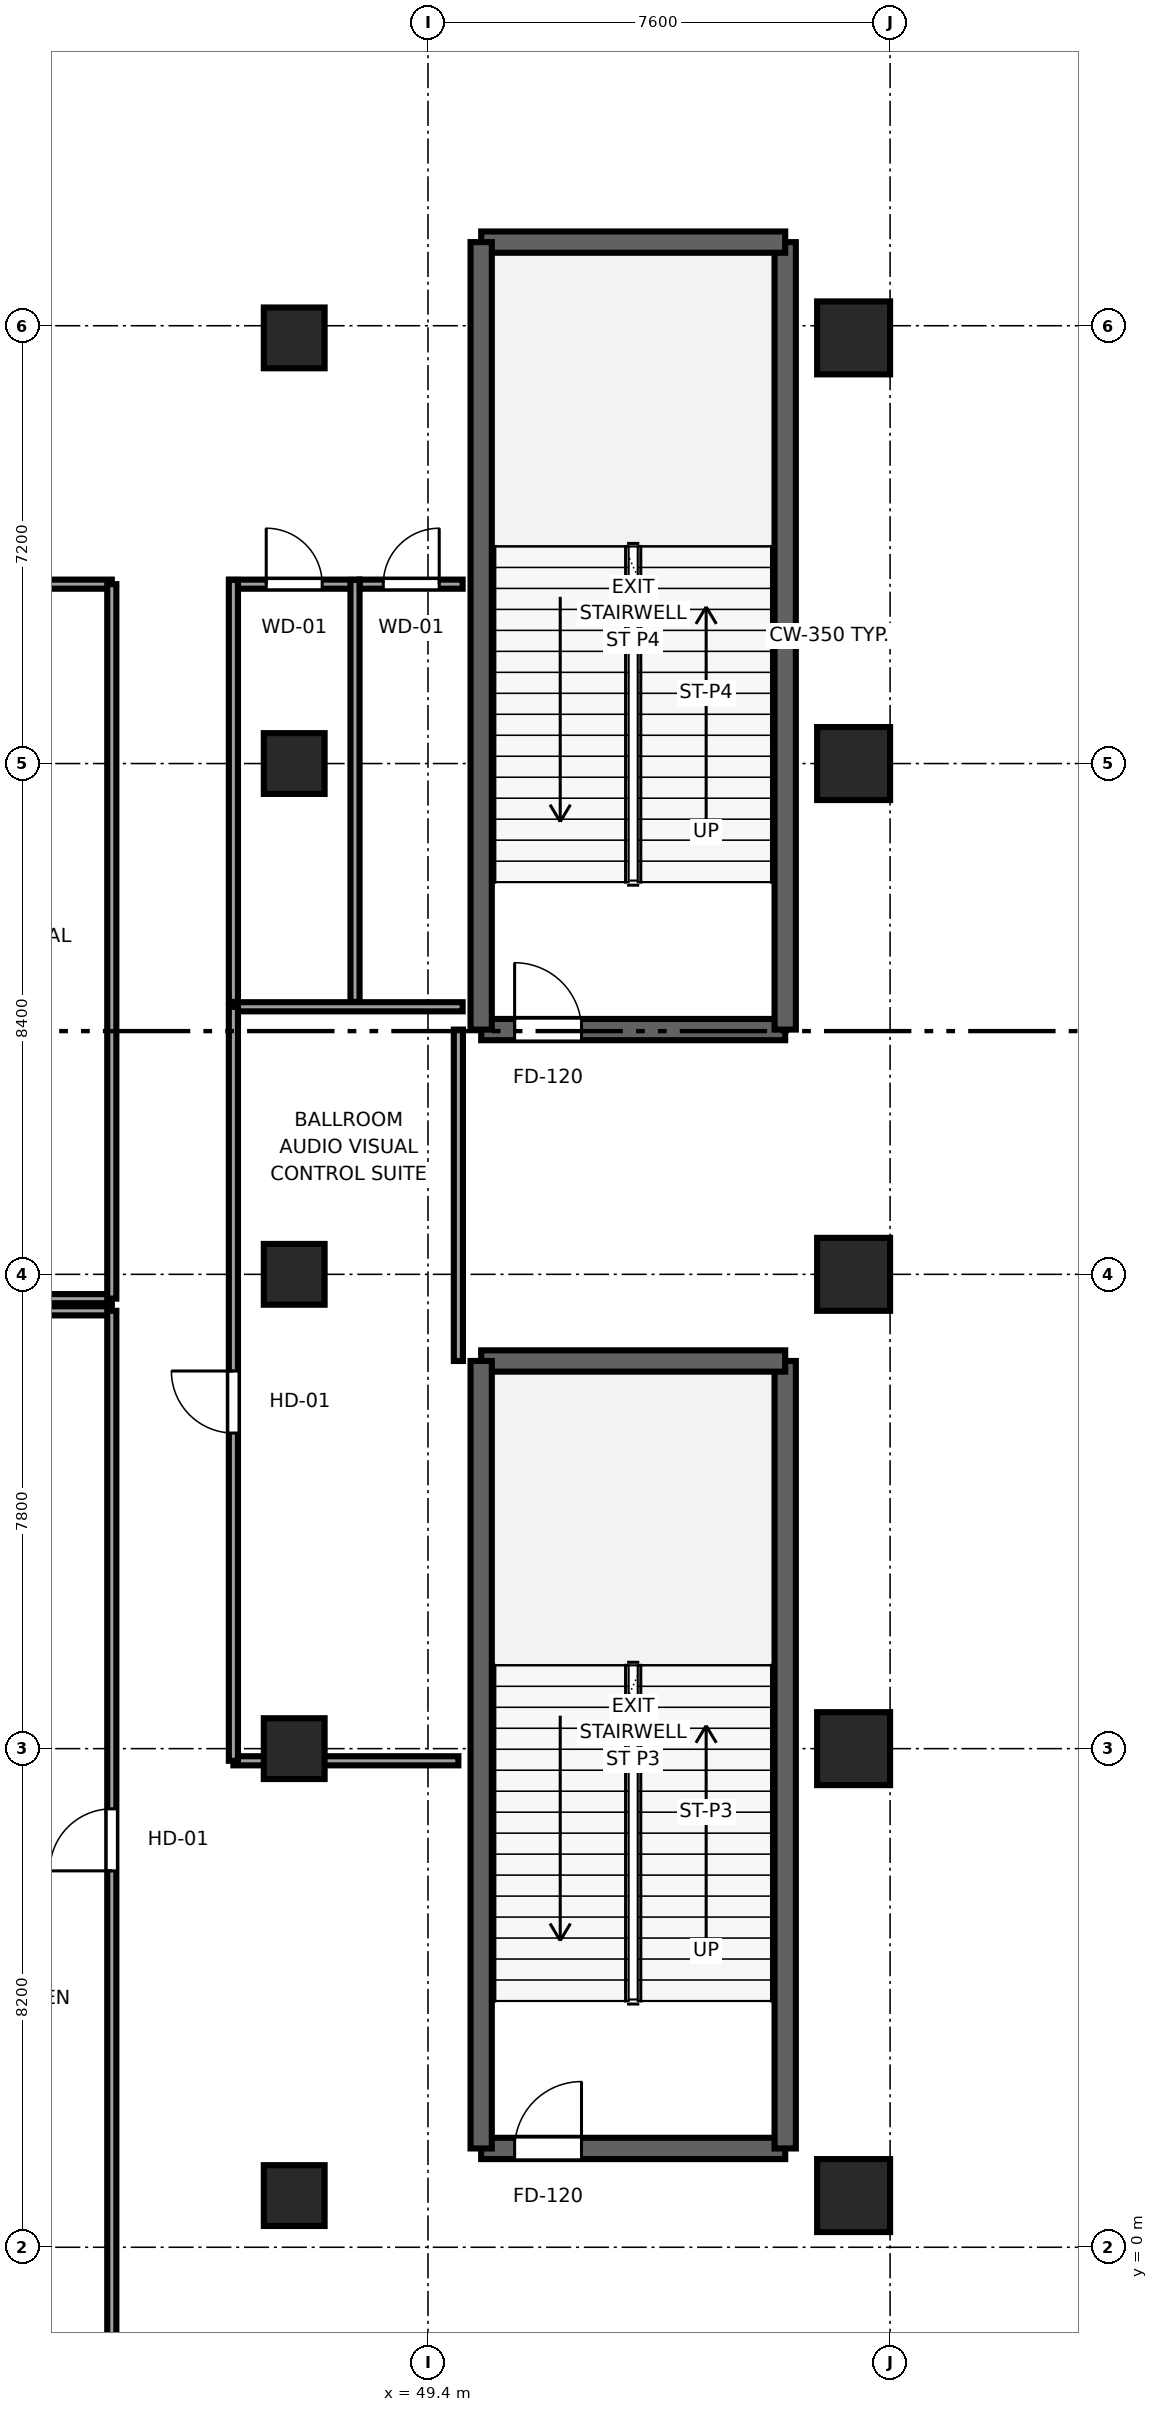
"""IFC4 building model, lengths in metres.
Left out: names, types, materials, properties, quantities, classifications, styles, units other than length and angle.
Written with IfcOpenShell. Run it as: python <this file> out.ifc"""

import sys

from ifc_helpers import new_model, si_unit, direction, frame, frame_2d, origin, origin_2d, place, context, subcontext, project, spatial, rectangle, extrude, source, transform, mapped, element, fill, save


model = new_model("IFC4")
c1 = context("Model", 3, precision=1e-05, world=origin(), true_north=direction((0.0, 1.0)))
c2 = subcontext(c1, "Body", "Model", "MODEL_VIEW")
j1 = project(units=[si_unit("LENGTHUNIT", "METRE"), si_unit("PLANEANGLEUNIT", "RADIAN")], contexts=[c1])
p1 = place(None, origin())
s1 = spatial("IfcSite", under=j1, at=p1, CompositionType="ELEMENT")
p2 = place(p1, origin())
s2 = spatial("IfcBuilding", under=s1, at=p2, CompositionType="ELEMENT")
p3 = place(p2, frame((0.0, 0.0, 16.0)))
s3 = spatial("IfcBuildingStorey", under=s2, at=p3, CompositionType="ELEMENT", Elevation=16.0)
p4 = place(p3, frame((50.275, 1.625, 0.0), z_axis=(0.0, 0.0, 1.0), x_axis=(1.0, 0.0, 0.0)))
e1 = element("IfcWall", 1, at=p4, inside=s3, PredefinedType="SHEAR", context=c2, shape_type="SweptSolid", body=[
    extrude(rectangle(XDim=5.0, YDim=0.35, at=frame_2d((2.5, 0.0))), origin(), (0.0, 0.0, 1.0), 6.4),
])
p5 = place(p4, frame((0.55, 0.0, 0.0)))
e2 = element("IfcOpeningElement", 2, at=p5, cuts=e1, PredefinedType="OPENING", context=c2, shape_type="SweptSolid", body=[
    extrude(rectangle(XDim=1.1, YDim=2.12, at=frame_2d((0.55, 1.06))), frame((0.0, 0.185, 0.0), z_axis=(0.0, -1.0, 0.0), x_axis=(1.0, 0.0, 0.0)), (0.0, 0.0, 1.0), 0.37),
])
p6 = place(p3, frame((55.275, 1.625, 0.0), z_axis=(0.0, 0.0, 1.0), x_axis=(0.0, 1.0, 0.0)))
e3 = element("IfcWall", 3, at=p6, inside=s3, PredefinedType="SHEAR", context=c2, shape_type="SweptSolid", body=[
    extrude(rectangle(XDim=12.95, YDim=0.35, at=frame_2d((6.475, 0.0))), origin(), (0.0, 0.0, 1.0), 6.4),
])
p7 = place(p3, frame((55.275, 14.575, 0.0), z_axis=(0.0, 0.0, 1.0), x_axis=(-1.0, 0.0, 0.0)))
e4 = element("IfcWall", 4, at=p7, inside=s3, PredefinedType="SHEAR", context=c2, shape_type="SweptSolid", body=[
    extrude(rectangle(XDim=5.0, YDim=0.35, at=frame_2d((2.5, 0.0))), origin(), (0.0, 0.0, 1.0), 6.4),
])
p8 = place(p3, frame((50.275, 14.575, 0.0), z_axis=(0.0, 0.0, 1.0), x_axis=(0.0, -1.0, 0.0)))
e5 = element("IfcWall", 5, at=p8, inside=s3, PredefinedType="SHEAR", context=c2, shape_type="SweptSolid", body=[
    extrude(rectangle(XDim=12.95, YDim=0.35, at=frame_2d((6.475, 0.0))), origin(), (0.0, 0.0, 1.0), 6.4),
])
p9 = place(p3, frame((50.275, 20.025, 0.0), z_axis=(0.0, 0.0, 1.0), x_axis=(1.0, 0.0, 0.0)))
e6 = element("IfcWall", 6, at=p9, inside=s3, PredefinedType="SHEAR", context=c2, shape_type="SweptSolid", body=[
    extrude(rectangle(XDim=5.0, YDim=0.35, at=frame_2d((2.5, 0.0))), origin(), (0.0, 0.0, 1.0), 6.4),
])
p10 = place(p9, frame((0.55, 0.0, 0.0)))
e7 = element("IfcOpeningElement", 7, at=p10, cuts=e6, PredefinedType="OPENING", context=c2, shape_type="SweptSolid", body=[
    extrude(rectangle(XDim=1.1, YDim=2.12, at=frame_2d((0.55, 1.06))), frame((0.0, 0.185, 0.0), z_axis=(0.0, -1.0, 0.0), x_axis=(1.0, 0.0, 0.0)), (0.0, 0.0, 1.0), 0.37),
])
p11 = place(p3, frame((55.275, 20.025, 0.0), z_axis=(0.0, 0.0, 1.0), x_axis=(0.0, 1.0, 0.0)))
e8 = element("IfcWall", 8, at=p11, inside=s3, PredefinedType="SHEAR", context=c2, shape_type="SweptSolid", body=[
    extrude(rectangle(XDim=12.95, YDim=0.35, at=frame_2d((6.475, 0.0))), origin(), (0.0, 0.0, 1.0), 6.4),
])
p12 = place(p3, frame((55.275, 32.975, 0.0), z_axis=(0.0, 0.0, 1.0), x_axis=(-1.0, 0.0, 0.0)))
e9 = element("IfcWall", 9, at=p12, inside=s3, PredefinedType="SHEAR", context=c2, shape_type="SweptSolid", body=[
    extrude(rectangle(XDim=5.0, YDim=0.35, at=frame_2d((2.5, 0.0))), origin(), (0.0, 0.0, 1.0), 6.4),
])
p13 = place(p3, frame((50.275, 32.975, 0.0), z_axis=(0.0, 0.0, 1.0), x_axis=(0.0, -1.0, 0.0)))
e10 = element("IfcWall", 10, at=p13, inside=s3, PredefinedType="SHEAR", context=c2, shape_type="SweptSolid", body=[
    extrude(rectangle(XDim=12.95, YDim=0.35, at=frame_2d((6.475, 0.0))), origin(), (0.0, 0.0, 1.0), 6.4),
])
m1 = source(origin(), c2, "Body", "SweptSolid", [
    extrude(rectangle(XDim=1.0, YDim=1.0, at=origin_2d()), origin(), (0.0, 0.0, 1.0), 6.4),
])
p14 = place(p3, frame((47.2, 0.85, 0.0), z_axis=(0.0, 0.0, 1.0), x_axis=(1.0, 0.0, 0.0)))
e11 = element("IfcColumn", 11, at=p14, inside=s3, PredefinedType="COLUMN", context=c2, shape_type="MappedRepresentation", body=[
    mapped(m1, transform((0.0, 0.0, 0.0), x_axis=(1.0, 0.0, 0.0), y_axis=(0.0, 1.0, 0.0), z_axis=(0.0, 0.0, 1.0), scale=1.0)),
])
m2 = source(origin(), c2, "Body", "SweptSolid", [
    extrude(rectangle(XDim=1.2, YDim=1.2, at=origin_2d()), origin(), (0.0, 0.0, 1.0), 6.4),
])
p15 = place(p3, frame((56.4, 0.85, 0.0), z_axis=(0.0, 0.0, 1.0), x_axis=(1.0, 0.0, 0.0)))
e12 = element("IfcColumn", 12, at=p15, inside=s3, PredefinedType="COLUMN", context=c2, shape_type="MappedRepresentation", body=[
    mapped(m2, transform((0.0, 0.0, 0.0), x_axis=(1.0, 0.0, 0.0), y_axis=(0.0, 1.0, 0.0), z_axis=(0.0, 0.0, 1.0), scale=1.0)),
])
p16 = place(p3, frame((47.2, 8.2, 0.0), z_axis=(0.0, 0.0, 1.0), x_axis=(1.0, 0.0, 0.0)))
e13 = element("IfcColumn", 13, at=p16, inside=s3, PredefinedType="COLUMN", context=c2, shape_type="MappedRepresentation", body=[
    mapped(m1, transform((0.0, 0.0, 0.0), x_axis=(1.0, 0.0, 0.0), y_axis=(0.0, 1.0, 0.0), z_axis=(0.0, 0.0, 1.0), scale=1.0)),
])
p17 = place(p3, frame((56.4, 8.2, 0.0), z_axis=(0.0, 0.0, 1.0), x_axis=(1.0, 0.0, 0.0)))
e14 = element("IfcColumn", 14, at=p17, inside=s3, PredefinedType="COLUMN", context=c2, shape_type="MappedRepresentation", body=[
    mapped(m2, transform((0.0, 0.0, 0.0), x_axis=(1.0, 0.0, 0.0), y_axis=(0.0, 1.0, 0.0), z_axis=(0.0, 0.0, 1.0), scale=1.0)),
])
p18 = place(p3, frame((47.2, 16.0, 0.0), z_axis=(0.0, 0.0, 1.0), x_axis=(1.0, 0.0, 0.0)))
e15 = element("IfcColumn", 15, at=p18, inside=s3, PredefinedType="COLUMN", context=c2, shape_type="MappedRepresentation", body=[
    mapped(m1, transform((0.0, 0.0, 0.0), x_axis=(1.0, 0.0, 0.0), y_axis=(0.0, 1.0, 0.0), z_axis=(0.0, 0.0, 1.0), scale=1.0)),
])
p19 = place(p3, frame((56.4, 16.0, 0.0), z_axis=(0.0, 0.0, 1.0), x_axis=(1.0, 0.0, 0.0)))
e16 = element("IfcColumn", 16, at=p19, inside=s3, PredefinedType="COLUMN", context=c2, shape_type="MappedRepresentation", body=[
    mapped(m2, transform((0.0, 0.0, 0.0), x_axis=(1.0, 0.0, 0.0), y_axis=(0.0, 1.0, 0.0), z_axis=(0.0, 0.0, 1.0), scale=1.0)),
])
p20 = place(p3, frame((47.2, 24.4, 0.0), z_axis=(0.0, 0.0, 1.0), x_axis=(1.0, 0.0, 0.0)))
e17 = element("IfcColumn", 17, at=p20, inside=s3, PredefinedType="COLUMN", context=c2, shape_type="MappedRepresentation", body=[
    mapped(m1, transform((0.0, 0.0, 0.0), x_axis=(1.0, 0.0, 0.0), y_axis=(0.0, 1.0, 0.0), z_axis=(0.0, 0.0, 1.0), scale=1.0)),
])
p21 = place(p3, frame((56.4, 24.4, 0.0), z_axis=(0.0, 0.0, 1.0), x_axis=(1.0, 0.0, 0.0)))
e18 = element("IfcColumn", 18, at=p21, inside=s3, PredefinedType="COLUMN", context=c2, shape_type="MappedRepresentation", body=[
    mapped(m2, transform((0.0, 0.0, 0.0), x_axis=(1.0, 0.0, 0.0), y_axis=(0.0, 1.0, 0.0), z_axis=(0.0, 0.0, 1.0), scale=1.0)),
])
p22 = place(p3, frame((47.2, 31.4, 0.0), z_axis=(0.0, 0.0, 1.0), x_axis=(1.0, 0.0, 0.0)))
e19 = element("IfcColumn", 19, at=p22, inside=s3, PredefinedType="COLUMN", context=c2, shape_type="MappedRepresentation", body=[
    mapped(m1, transform((0.0, 0.0, 0.0), x_axis=(1.0, 0.0, 0.0), y_axis=(0.0, 1.0, 0.0), z_axis=(0.0, 0.0, 1.0), scale=1.0)),
])
p23 = place(p3, frame((56.4, 31.4, 0.0), z_axis=(0.0, 0.0, 1.0), x_axis=(1.0, 0.0, 0.0)))
e20 = element("IfcColumn", 20, at=p23, inside=s3, PredefinedType="COLUMN", context=c2, shape_type="MappedRepresentation", body=[
    mapped(m2, transform((0.0, 0.0, 0.0), x_axis=(1.0, 0.0, 0.0), y_axis=(0.0, 1.0, 0.0), z_axis=(0.0, 0.0, 1.0), scale=1.0)),
])
p24 = place(p3, frame((38.0, 15.4, 0.0), z_axis=(0.0, 0.0, 1.0), x_axis=(1.0, 0.0, 0.0)))
e21 = element("IfcWall", 21, at=p24, inside=s3, PredefinedType="PARTITIONING", context=c2, shape_type="SweptSolid", body=[
    extrude(rectangle(XDim=6.2, YDim=0.15, at=frame_2d((3.1, 0.0))), origin(), (0.0, 0.0, 1.0), 6.14),
])
p25 = place(p3, frame((44.2, -2.0, 0.0), z_axis=(0.0, 0.0, 1.0), x_axis=(0.0, 1.0, 0.0)))
e22 = element("IfcWall", 22, at=p25, inside=s3, PredefinedType="PARTITIONING", context=c2, shape_type="SweptSolid", body=[
    extrude(rectangle(XDim=17.4, YDim=0.15, at=frame_2d((8.7, 0.0))), origin(), (0.0, 0.0, 1.0), 5.676),
])
p26 = place(p25, frame((8.19, 0.0, 0.0)))
e23 = element("IfcOpeningElement", 23, at=p26, cuts=e22, PredefinedType="OPENING", context=c2, shape_type="SweptSolid", body=[
    extrude(rectangle(XDim=1.02, YDim=2.03, at=frame_2d((0.51, 1.015))), frame((0.0, 0.085, 0.0), z_axis=(0.0, -1.0, 0.0), x_axis=(1.0, 0.0, 0.0)), (0.0, 0.0, 1.0), 0.17),
])
p27 = place(p3, frame((38.0, 15.6, 0.0), z_axis=(0.0, 0.0, 1.0), x_axis=(1.0, 0.0, 0.0)))
e24 = element("IfcWall", 24, at=p27, inside=s3, PredefinedType="PARTITIONING", context=c2, shape_type="SweptSolid", body=[
    extrude(rectangle(XDim=6.2, YDim=0.15, at=frame_2d((3.1, 0.0))), origin(), (0.0, 0.0, 1.0), 6.14),
])
p28 = place(p3, frame((38.0, 27.35, 0.0), z_axis=(0.0, 0.0, 1.0), x_axis=(1.0, 0.0, 0.0)))
e25 = element("IfcWall", 25, at=p28, inside=s3, PredefinedType="PARTITIONING", context=c2, shape_type="SweptSolid", body=[
    extrude(rectangle(XDim=6.2, YDim=0.15, at=frame_2d((3.1, 0.0))), origin(), (0.0, 0.0, 1.0), 3.73),
])
p29 = place(p28, frame((2.275, 0.0, 0.0)))
e26 = element("IfcOpeningElement", 26, at=p29, cuts=e25, PredefinedType="OPENING", context=c2, shape_type="SweptSolid", body=[
    extrude(rectangle(XDim=1.65, YDim=2.15, at=frame_2d((0.825, 1.075))), frame((0.0, 0.085, 0.0), z_axis=(0.0, -1.0, 0.0), x_axis=(1.0, 0.0, 0.0)), (0.0, 0.0, 1.0), 0.17),
])
p30 = place(p3, frame((44.2, 15.6, 0.0), z_axis=(0.0, 0.0, 1.0), x_axis=(0.0, 1.0, 0.0)))
e27 = element("IfcWall", 27, at=p30, inside=s3, PredefinedType="PARTITIONING", context=c2, shape_type="SweptSolid", body=[
    extrude(rectangle(XDim=11.75, YDim=0.15, at=frame_2d((5.875, 0.0))), origin(), (0.0, 0.0, 1.0), 5.676),
])
p31 = place(p3, frame((46.2, 8.0, 0.0), z_axis=(0.0, 0.0, 1.0), x_axis=(1.0, 0.0, 0.0)))
e28 = element("IfcWall", 28, at=p31, inside=s3, PredefinedType="PARTITIONING", context=c2, shape_type="SweptSolid", body=[
    extrude(rectangle(XDim=3.7, YDim=0.15, at=frame_2d((1.85, 0.0))), origin(), (0.0, 0.0, 1.0), 5.314),
])
p32 = place(p3, frame((46.13, 20.4, 0.0), z_axis=(0.0, 0.0, 1.0), x_axis=(1.0, 0.0, 0.0)))
e29 = element("IfcWall", 29, at=p32, inside=s3, PredefinedType="PARTITIONING", context=c2, shape_type="SweptSolid", body=[
    extrude(rectangle(XDim=3.84, YDim=0.15, at=frame_2d((1.92, 0.0))), origin(), (0.0, 0.0, 1.0), 6.14),
])
p33 = place(p3, frame((46.2, 8.0, 0.0), z_axis=(0.0, 0.0, 1.0), x_axis=(0.0, 1.0, 0.0)))
e30 = element("IfcWall", 30, at=p33, inside=s3, PredefinedType="PARTITIONING", context=c2, shape_type="SweptSolid", body=[
    extrude(rectangle(XDim=12.4, YDim=0.15, at=frame_2d((6.2, 0.0))), origin(), (0.0, 0.0, 1.0), 6.14),
])
p34 = place(p33, frame((5.39, 0.0, 0.0)))
e31 = element("IfcOpeningElement", 31, at=p34, cuts=e30, PredefinedType="OPENING", context=c2, shape_type="SweptSolid", body=[
    extrude(rectangle(XDim=1.02, YDim=2.03, at=frame_2d((0.51, 1.015))), frame((0.0, 0.085, 0.0), z_axis=(0.0, -1.0, 0.0), x_axis=(1.0, 0.0, 0.0)), (0.0, 0.0, 1.0), 0.17),
])
p35 = place(p3, frame((49.9, 14.575, 0.0), z_axis=(0.0, 0.0, 1.0), x_axis=(0.0, 1.0, 0.0)))
e32 = element("IfcWall", 32, at=p35, inside=s3, PredefinedType="PARTITIONING", context=c2, shape_type="SweptSolid", body=[
    extrude(rectangle(XDim=5.45, YDim=0.15, at=frame_2d((2.725, 0.0))), origin(), (0.0, 0.0, 1.0), 6.14),
])
p36 = place(p3, frame((46.13, 27.35, 0.0), z_axis=(0.0, 0.0, 1.0), x_axis=(1.0, 0.0, 0.0)))
e33 = element("IfcWall", 33, at=p36, inside=s3, PredefinedType="PARTITIONING", context=c2, shape_type="SweptSolid", body=[
    extrude(rectangle(XDim=2.14, YDim=0.15, at=frame_2d((1.07, 0.0))), origin(), (0.0, 0.0, 1.0), 6.14),
])
p37 = place(p36, frame((0.61, 0.0, 0.0)))
e34 = element("IfcOpeningElement", 34, at=p37, cuts=e33, PredefinedType="OPENING", context=c2, shape_type="SweptSolid", body=[
    extrude(rectangle(XDim=0.92, YDim=2.01, at=frame_2d((0.46, 1.005))), frame((0.0, 0.085, 0.0), z_axis=(0.0, -1.0, 0.0), x_axis=(1.0, 0.0, 0.0)), (0.0, 0.0, 1.0), 0.17),
])
for number, where, z_axis, x_axis in (
    (35, (46.2, 20.48, 0.0), (0.0, 0.0, 1.0), (0.0, 1.0, 0.0)),
    (36, (48.2, 20.48, 0.0), (0.0, 0.0, 1.0), (0.0, 1.0, 0.0)),
):
    element("IfcWall", number, at=place(p3, frame(where, z_axis=z_axis, x_axis=x_axis)), inside=s3, PredefinedType="PARTITIONING", context=c2, shape_type="SweptSolid", body=[
        extrude(rectangle(XDim=6.94, YDim=0.15, at=frame_2d((3.47, 0.0))), origin(), (0.0, 0.0, 1.0), 6.14),
    ])
p38 = place(p3, frame((48.28, 27.35, 0.0), z_axis=(0.0, 0.0, 1.0), x_axis=(1.0, 0.0, 0.0)))
e37 = element("IfcWall", 37, at=p38, inside=s3, PredefinedType="PARTITIONING", context=c2, shape_type="SweptSolid", body=[
    extrude(rectangle(XDim=1.69, YDim=0.15, at=frame_2d((0.845, 0.0))), origin(), (0.0, 0.0, 1.0), 6.14),
])
p39 = place(p38, frame((0.385, 0.0, 0.0)))
e38 = element("IfcOpeningElement", 38, at=p39, cuts=e37, PredefinedType="OPENING", context=c2, shape_type="SweptSolid", body=[
    extrude(rectangle(XDim=0.92, YDim=2.01, at=frame_2d((0.46, 1.005))), frame((0.0, 0.085, 0.0), z_axis=(0.0, -1.0, 0.0), x_axis=(1.0, 0.0, 0.0)), (0.0, 0.0, 1.0), 0.17),
])
m3 = source(origin(), c2, "Body", "SweptSolid", [
    extrude(rectangle(XDim=1.1, YDim=2.12, at=frame_2d((0.55, 1.06))), frame((0.0, 0.025, 0.0), z_axis=(0.0, -1.0, 0.0), x_axis=(1.0, 0.0, 0.0)), (0.0, 0.0, 1.0), 0.05),
])
p40 = place(p5, origin())
e39 = element("IfcDoor", 39, at=p40, inside=s3, OperationType="SINGLE_SWING_RIGHT", PredefinedType="DOOR", context=c2, shape_type="MappedRepresentation", body=[
    mapped(m3, transform((0.0, 0.0, 0.0), x_axis=(1.0, 0.0, 0.0), y_axis=(0.0, 1.0, 0.0), z_axis=(0.0, 0.0, 1.0), scale=1.0)),
])
fill(e2, e39)
p41 = place(p10, origin())
e40 = element("IfcDoor", 40, at=p41, inside=s3, OperationType="SINGLE_SWING_LEFT", PredefinedType="DOOR", context=c2, shape_type="MappedRepresentation", body=[
    mapped(m3, transform((0.0, 0.0, 0.0), x_axis=(1.0, 0.0, 0.0), y_axis=(0.0, 1.0, 0.0), z_axis=(0.0, 0.0, 1.0), scale=1.0)),
])
fill(e7, e40)
m4 = source(origin(), c2, "Body", "SweptSolid", [
    extrude(rectangle(XDim=1.02, YDim=2.03, at=frame_2d((0.51, 1.015))), frame((0.0, 0.025, 0.0), z_axis=(0.0, -1.0, 0.0), x_axis=(1.0, 0.0, 0.0)), (0.0, 0.0, 1.0), 0.05),
])
p42 = place(p26, origin())
e41 = element("IfcDoor", 41, at=p42, inside=s3, OperationType="SINGLE_SWING_LEFT", PredefinedType="DOOR", context=c2, shape_type="MappedRepresentation", body=[
    mapped(m4, transform((0.0, 0.0, 0.0), x_axis=(1.0, 0.0, 0.0), y_axis=(0.0, 1.0, 0.0), z_axis=(0.0, 0.0, 1.0), scale=1.0)),
])
fill(e23, e41)
p43 = place(p34, origin())
e42 = element("IfcDoor", 42, at=p43, inside=s3, OperationType="SINGLE_SWING_RIGHT", PredefinedType="DOOR", context=c2, shape_type="MappedRepresentation", body=[
    mapped(m4, transform((0.0, 0.0, 0.0), x_axis=(1.0, 0.0, 0.0), y_axis=(0.0, 1.0, 0.0), z_axis=(0.0, 0.0, 1.0), scale=1.0)),
])
fill(e31, e42)
m5 = source(origin(), c2, "Body", "SweptSolid", [
    extrude(rectangle(XDim=0.92, YDim=2.01, at=frame_2d((0.46, 1.005))), frame((0.0, 0.025, 0.0), z_axis=(0.0, -1.0, 0.0), x_axis=(1.0, 0.0, 0.0)), (0.0, 0.0, 1.0), 0.05),
])
p44 = place(p37, origin())
e43 = element("IfcDoor", 43, at=p44, inside=s3, OperationType="SINGLE_SWING_LEFT", PredefinedType="DOOR", context=c2, shape_type="MappedRepresentation", body=[
    mapped(m5, transform((0.0, 0.0, 0.0), x_axis=(1.0, 0.0, 0.0), y_axis=(0.0, 1.0, 0.0), z_axis=(0.0, 0.0, 1.0), scale=1.0)),
])
fill(e34, e43)
p45 = place(p39, origin())
e44 = element("IfcDoor", 44, at=p45, inside=s3, OperationType="SINGLE_SWING_RIGHT", PredefinedType="DOOR", context=c2, shape_type="MappedRepresentation", body=[
    mapped(m5, transform((0.0, 0.0, 0.0), x_axis=(1.0, 0.0, 0.0), y_axis=(0.0, 1.0, 0.0), z_axis=(0.0, 0.0, 1.0), scale=1.0)),
])
fill(e38, e44)
save(model, sys.argv[1])
